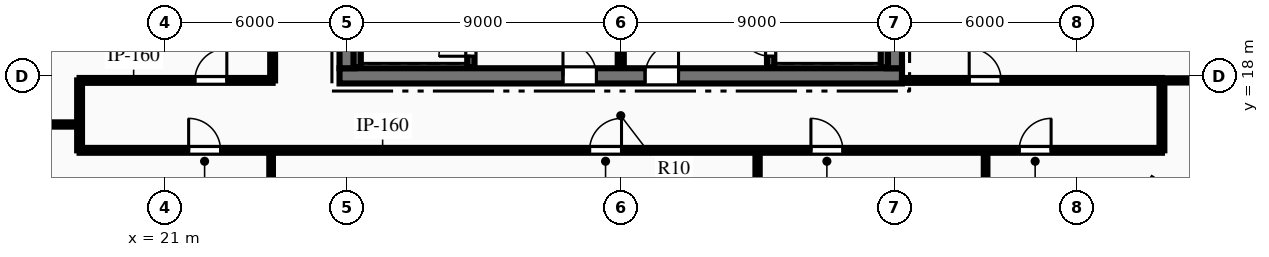
"""IFC4 building model, lengths in metres.
Left out: names, types, materials, properties, quantities, classifications, styles, units other than length and angle.
Written with IfcOpenShell. Run it as: python <this file> out.ifc"""

import sys

from ifc_helpers import new_model, si_unit, direction, frame, frame_2d, origin, place, context, subcontext, project, spatial, rectangle, extrude, element, fill, save


model = new_model("IFC4")
c1 = context("Model", 3, precision=1e-05, world=origin(), true_north=direction((0.0, 1.0)))
c2 = subcontext(c1, "Body", "Model", "MODEL_VIEW")
j1 = project(units=[si_unit("LENGTHUNIT", "METRE"), si_unit("PLANEANGLEUNIT", "RADIAN")], contexts=[c1])
p1 = place(None, origin())
s1 = spatial("IfcSite", under=j1, at=p1, CompositionType="ELEMENT")
p2 = place(p1, origin())
s2 = spatial("IfcBuilding", under=s1, at=p2, CompositionType="ELEMENT")
p3 = place(p2, frame((0.0, 0.0, 228.45)))
s3 = spatial("IfcBuildingStorey", under=s2, at=p3, CompositionType="ELEMENT", Elevation=228.45)
p4 = place(p3, frame((26.75, 18.0, 0.0), z_axis=(0.0, 0.0, 1.0), x_axis=(1.0, 0.0, 0.0)))
e1 = element("IfcWall", 1, at=p4, inside=s3, PredefinedType="SHEAR", context=c2, shape_type="SweptSolid", body=[
    extrude(rectangle(XDim=18.5, YDim=0.5, at=frame_2d((9.25, 0.0))), origin(), (0.0, 0.0, 1.0), 3.75),
])
p5 = place(p4, frame((7.35, 0.0, 0.0)))
e2 = element("IfcOpeningElement", 2, at=p5, cuts=e1, PredefinedType="OPENING", context=c2, shape_type="SweptSolid", body=[
    extrude(rectangle(XDim=1.1, YDim=2.15, at=frame_2d((0.55, 1.075))), frame((0.0, 0.26, 0.0), z_axis=(0.0, -1.0, 0.0), x_axis=(1.0, 0.0, 0.0)), (0.0, 0.0, 1.0), 0.52),
])
p6 = place(p4, frame((10.05, 0.0, 0.0)))
e3 = element("IfcOpeningElement", 3, at=p6, cuts=e1, PredefinedType="OPENING", context=c2, shape_type="SweptSolid", body=[
    extrude(rectangle(XDim=1.1, YDim=2.15, at=frame_2d((0.55, 1.075))), frame((0.0, 0.26, 0.0), z_axis=(0.0, -1.0, 0.0), x_axis=(1.0, 0.0, 0.0)), (0.0, 0.0, 1.0), 0.52),
])
p7 = place(p3, frame((27.0, 18.25, 0.0), z_axis=(0.0, 0.0, 1.0), x_axis=(0.0, 1.0, 0.0)))
e4 = element("IfcWall", 4, at=p7, inside=s3, PredefinedType="SHEAR", context=c2, shape_type="SweptSolid", body=[
    extrude(rectangle(XDim=15.5, YDim=0.5, at=frame_2d((7.75, 0.0))), origin(), (0.0, 0.0, 1.0), 3.75),
])
p8 = place(p7, frame((9.99, 0.0, 0.0)))
e5 = element("IfcOpeningElement", 5, at=p8, cuts=e4, PredefinedType="OPENING", context=c2, shape_type="SweptSolid", body=[
    extrude(rectangle(XDim=1.4, YDim=2.2, at=frame_2d((0.7, 1.1))), frame((0.0, 0.26, 0.0), z_axis=(0.0, -1.0, 0.0), x_axis=(1.0, 0.0, 0.0)), (0.0, 0.0, 1.0), 0.52),
])
p9 = place(p3, frame((45.0, 18.25, 0.0), z_axis=(0.0, 0.0, 1.0), x_axis=(0.0, 1.0, 0.0)))
e6 = element("IfcWall", 6, at=p9, inside=s3, PredefinedType="SHEAR", context=c2, shape_type="SweptSolid", body=[
    extrude(rectangle(XDim=15.5, YDim=0.5, at=frame_2d((7.75, 0.0))), origin(), (0.0, 0.0, 1.0), 3.75),
])
p10 = place(p9, frame((9.99, 0.0, 0.0)))
e7 = element("IfcOpeningElement", 7, at=p10, cuts=e6, PredefinedType="OPENING", context=c2, shape_type="SweptSolid", body=[
    extrude(rectangle(XDim=1.4, YDim=2.2, at=frame_2d((0.7, 1.1))), frame((0.0, 0.26, 0.0), z_axis=(0.0, -1.0, 0.0), x_axis=(1.0, 0.0, 0.0)), (0.0, 0.0, 1.0), 0.52),
])
p11 = place(p3, frame((31.07, 18.28, 0.0), z_axis=(0.0, 0.0, 1.0), x_axis=(0.0, 1.0, 0.0)))
e8 = element("IfcWall", 8, at=p11, inside=s3, PredefinedType="SHEAR", context=c2, shape_type="SweptSolid", body=[
    extrude(rectangle(XDim=8.26, YDim=0.24, at=frame_2d((4.13, 0.0))), origin(), (0.0, 0.0, 1.0), 3.75),
])
p12 = place(p11, frame((0.365, 0.0, 0.0)))
e9 = element("IfcOpeningElement", 9, at=p12, cuts=e8, PredefinedType="OPENING", context=c2, shape_type="SweptSolid", body=[
    extrude(rectangle(XDim=1.05, YDim=2.15, at=frame_2d((0.525, 1.075))), frame((0.0, 0.13, 0.0), z_axis=(0.0, -1.0, 0.0), x_axis=(1.0, 0.0, 0.0)), (0.0, 0.0, 1.0), 0.26),
])
p13 = place(p3, frame((27.33, 18.28, 0.0), z_axis=(0.0, 0.0, 1.0), x_axis=(0.0, 1.0, 0.0)))
e10 = element("IfcWall", 10, at=p13, inside=s3, PredefinedType="SHEAR", context=c2, shape_type="SweptSolid", body=[
    extrude(rectangle(XDim=8.26, YDim=0.24, at=frame_2d((4.13, 0.0))), origin(), (0.0, 0.0, 1.0), 3.75),
])
p14 = place(p3, frame((40.93, 18.28, 0.0), z_axis=(0.0, 0.0, 1.0), x_axis=(0.0, 1.0, 0.0)))
e11 = element("IfcWall", 11, at=p14, inside=s3, PredefinedType="SHEAR", context=c2, shape_type="SweptSolid", body=[
    extrude(rectangle(XDim=8.26, YDim=0.24, at=frame_2d((4.13, 0.0))), origin(), (0.0, 0.0, 1.0), 3.75),
])
p15 = place(p14, frame((0.365, 0.0, 0.0)))
e12 = element("IfcOpeningElement", 12, at=p15, cuts=e11, PredefinedType="OPENING", context=c2, shape_type="SweptSolid", body=[
    extrude(rectangle(XDim=1.05, YDim=2.15, at=frame_2d((0.525, 1.075))), frame((0.0, 0.13, 0.0), z_axis=(0.0, -1.0, 0.0), x_axis=(1.0, 0.0, 0.0)), (0.0, 0.0, 1.0), 0.26),
])
p16 = place(p3, frame((44.67, 18.28, 0.0), z_axis=(0.0, 0.0, 1.0), x_axis=(0.0, 1.0, 0.0)))
e13 = element("IfcWall", 13, at=p16, inside=s3, PredefinedType="SHEAR", context=c2, shape_type="SweptSolid", body=[
    extrude(rectangle(XDim=8.26, YDim=0.24, at=frame_2d((4.13, 0.0))), origin(), (0.0, 0.0, 1.0), 3.75),
])
p17 = place(p3, frame((36.0, 18.28, 0.0), z_axis=(0.0, 0.0, 1.0), x_axis=(0.0, 1.0, 0.0)))
e14 = element("IfcWall", 14, at=p17, inside=s3, PredefinedType="PARTITIONING", context=c2, shape_type="SweptSolid", body=[
    extrude(rectangle(XDim=3.77, YDim=0.2, at=frame_2d((1.885, 0.0))), origin(), (0.0, 0.0, 1.0), 3.47),
])
p18 = place(p3, frame((18.2, 15.55, 0.0), z_axis=(0.0, 0.0, 1.0), x_axis=(1.0, 0.0, 0.0)))
e15 = element("IfcWall", 15, at=p18, inside=s3, PredefinedType="PARTITIONING", context=c2, shape_type="SweptSolid", body=[
    extrude(rectangle(XDim=35.6, YDim=0.16, at=frame_2d((17.8, 0.0))), origin(), (0.0, 0.0, 1.0), 3.008),
])
p19 = place(p18, frame((3.587, 0.0, 0.0)))
e16 = element("IfcOpeningElement", 16, at=p19, cuts=e15, PredefinedType="OPENING", context=c2, shape_type="SweptSolid", body=[
    extrude(rectangle(XDim=1.05, YDim=2.15, at=frame_2d((0.525, 1.075))), frame((0.0, 0.09, 0.0), z_axis=(0.0, -1.0, 0.0), x_axis=(1.0, 0.0, 0.0)), (0.0, 0.0, 1.0), 0.18),
])
p20 = place(p18, frame((16.775, 0.0, 0.0)))
e17 = element("IfcOpeningElement", 17, at=p20, cuts=e15, PredefinedType="OPENING", context=c2, shape_type="SweptSolid", body=[
    extrude(rectangle(XDim=1.05, YDim=2.15, at=frame_2d((0.525, 1.075))), frame((0.0, 0.09, 0.0), z_axis=(0.0, -1.0, 0.0), x_axis=(1.0, 0.0, 0.0)), (0.0, 0.0, 1.0), 0.18),
])
p21 = place(p18, frame((24.055, 0.0, 0.0)))
e18 = element("IfcOpeningElement", 18, at=p21, cuts=e15, PredefinedType="OPENING", context=c2, shape_type="SweptSolid", body=[
    extrude(rectangle(XDim=1.05, YDim=2.15, at=frame_2d((0.525, 1.075))), frame((0.0, 0.09, 0.0), z_axis=(0.0, -1.0, 0.0), x_axis=(1.0, 0.0, 0.0)), (0.0, 0.0, 1.0), 0.18),
])
p22 = place(p18, frame((30.905, 0.0, 0.0)))
e19 = element("IfcOpeningElement", 19, at=p22, cuts=e15, PredefinedType="OPENING", context=c2, shape_type="SweptSolid", body=[
    extrude(rectangle(XDim=1.05, YDim=2.15, at=frame_2d((0.525, 1.075))), frame((0.0, 0.09, 0.0), z_axis=(0.0, -1.0, 0.0), x_axis=(1.0, 0.0, 0.0)), (0.0, 0.0, 1.0), 0.18),
])
p23 = place(p3, frame((18.2, 17.85, 0.0), z_axis=(0.0, 0.0, 1.0), x_axis=(1.0, 0.0, 0.0)))
e20 = element("IfcWall", 20, at=p23, inside=s3, PredefinedType="PARTITIONING", context=c2, shape_type="SweptSolid", body=[
    extrude(rectangle(XDim=6.35, YDim=0.16, at=frame_2d((3.175, 0.0))), origin(), (0.0, 0.0, 1.0), 3.47),
])
p24 = place(p23, frame((3.793, 0.0, 0.0)))
e21 = element("IfcOpeningElement", 21, at=p24, cuts=e20, PredefinedType="OPENING", context=c2, shape_type="SweptSolid", body=[
    extrude(rectangle(XDim=1.05, YDim=2.15, at=frame_2d((0.525, 1.075))), frame((0.0, 0.09, 0.0), z_axis=(0.0, -1.0, 0.0), x_axis=(1.0, 0.0, 0.0)), (0.0, 0.0, 1.0), 0.18),
])
p25 = place(p3, frame((45.25, 17.85, 0.0), z_axis=(0.0, 0.0, 1.0), x_axis=(1.0, 0.0, 0.0)))
e22 = element("IfcWall", 22, at=p25, inside=s3, PredefinedType="PARTITIONING", context=c2, shape_type="SweptSolid", body=[
    extrude(rectangle(XDim=8.55, YDim=0.16, at=frame_2d((4.275, 0.0))), origin(), (0.0, 0.0, 1.0), 3.47),
])
p26 = place(p25, frame((2.211, 0.0, 0.0)))
e23 = element("IfcOpeningElement", 23, at=p26, cuts=e22, PredefinedType="OPENING", context=c2, shape_type="SweptSolid", body=[
    extrude(rectangle(XDim=1.05, YDim=2.15, at=frame_2d((0.525, 1.075))), frame((0.0, 0.09, 0.0), z_axis=(0.0, -1.0, 0.0), x_axis=(1.0, 0.0, 0.0)), (0.0, 0.0, 1.0), 0.18),
])
p27 = place(p3, frame((24.55, 17.85, 0.0), z_axis=(0.0, 0.0, 1.0), x_axis=(0.0, 1.0, 0.0)))
e24 = element("IfcWall", 24, at=p27, inside=s3, PredefinedType="PARTITIONING", context=c2, shape_type="SweptSolid", body=[
    extrude(rectangle(XDim=16.3, YDim=0.16, at=frame_2d((8.15, 0.0))), origin(), (0.0, 0.0, 1.0), 3.47),
])
p28 = place(p27, frame((5.425, 0.0, 0.0)))
e25 = element("IfcOpeningElement", 25, at=p28, cuts=e24, PredefinedType="OPENING", context=c2, shape_type="SweptSolid", body=[
    extrude(rectangle(XDim=1.05, YDim=2.15, at=frame_2d((0.525, 1.075))), frame((0.0, 0.09, 0.0), z_axis=(0.0, -1.0, 0.0), x_axis=(1.0, 0.0, 0.0)), (0.0, 0.0, 1.0), 0.18),
])
p29 = place(p27, frame((11.367, 0.0, 0.0)))
e26 = element("IfcOpeningElement", 26, at=p29, cuts=e24, PredefinedType="OPENING", context=c2, shape_type="SweptSolid", body=[
    extrude(rectangle(XDim=1.05, YDim=2.15, at=frame_2d((0.525, 1.075))), frame((0.0, 0.09, 0.0), z_axis=(0.0, -1.0, 0.0), x_axis=(1.0, 0.0, 0.0)), (0.0, 0.0, 1.0), 0.18),
])
for number, where, z_axis, x_axis in (
    (27, (18.2, 15.55, 0.0), (0.0, 0.0, 1.0), (0.0, 1.0, 0.0)),
    (28, (53.8, 15.55, 0.0), (0.0, 0.0, 1.0), (0.0, 1.0, 0.0)),
):
    element("IfcWall", number, at=place(p3, frame(where, z_axis=z_axis, x_axis=x_axis)), inside=s3, PredefinedType="PARTITIONING", context=c2, shape_type="SweptSolid", body=[
        extrude(rectangle(XDim=2.3, YDim=0.16, at=frame_2d((1.15, 0.0))), origin(), (0.0, 0.0, 1.0), 3.47),
    ])
p30 = place(p3, frame((9.112, 16.4, 0.0), z_axis=(0.0, 0.0, 1.0), x_axis=(1.0, 0.0, 0.0)))
e29 = element("IfcWall", 29, at=p30, inside=s3, PredefinedType="PARTITIONING", context=c2, shape_type="SweptSolid", body=[
    extrude(rectangle(XDim=9.088, YDim=0.14, at=frame_2d((4.544, 0.0))), origin(), (0.0, 0.0, 1.0), 3.47),
])
p31 = place(p3, frame((53.8, 17.85, 0.0), z_axis=(0.0, 0.0, 1.0), x_axis=(1.0, 0.0, 0.0)))
e30 = element("IfcWall", 30, at=p31, inside=s3, PredefinedType="PARTITIONING", context=c2, shape_type="SweptSolid", body=[
    extrude(rectangle(XDim=4.398, YDim=0.14, at=frame_2d((2.199, 0.0))), origin(), (0.0, 0.0, 1.0), 3.47),
])
p32 = place(p3, frame((24.5, 5.028, 0.0), z_axis=(0.0, 0.0, 1.0), x_axis=(0.0, 1.0, 0.0)))
e31 = element("IfcWall", 31, at=p32, inside=s3, PredefinedType="PARTITIONING", context=c2, shape_type="SweptSolid", body=[
    extrude(rectangle(XDim=10.522, YDim=0.12, at=frame_2d((5.261, 0.0))), origin(), (0.0, 0.0, 1.0), 2.849),
])
p33 = place(p3, frame((40.5, -4.284, 0.0), z_axis=(0.0, 0.0, 1.0), x_axis=(0.0, 1.0, 0.0)))
e32 = element("IfcWall", 32, at=p33, inside=s3, PredefinedType="PARTITIONING", context=c2, shape_type="SweptSolid", body=[
    extrude(rectangle(XDim=19.834, YDim=0.14, at=frame_2d((9.917, 0.0))), origin(), (0.0, 0.0, 1.0), 2.849),
])
p34 = place(p3, frame((48.0, 0.327, 0.0), z_axis=(0.0, 0.0, 1.0), x_axis=(0.0, 1.0, 0.0)))
e33 = element("IfcWall", 33, at=p34, inside=s3, PredefinedType="PARTITIONING", context=c2, shape_type="SweptSolid", body=[
    extrude(rectangle(XDim=15.223, YDim=0.12, at=frame_2d((7.611, 0.0))), origin(), (0.0, 0.0, 1.0), 3.47),
])
p35 = place(p12, origin())
e34 = element("IfcDoor", 34, at=p35, inside=s3, OperationType="SINGLE_SWING_LEFT", PredefinedType="DOOR", context=c2, shape_type="SweptSolid", body=[
    extrude(rectangle(XDim=1.05, YDim=2.15, at=frame_2d((0.525, 1.075))), frame((0.0, 0.025, 0.0), z_axis=(0.0, -1.0, 0.0), x_axis=(1.0, 0.0, 0.0)), (0.0, 0.0, 1.0), 0.05),
])
fill(e9, e34)
p36 = place(p15, origin())
e35 = element("IfcDoor", 35, at=p36, inside=s3, OperationType="SINGLE_SWING_RIGHT", PredefinedType="DOOR", context=c2, shape_type="SweptSolid", body=[
    extrude(rectangle(XDim=1.05, YDim=2.15, at=frame_2d((0.525, 1.075))), frame((0.0, 0.025, 0.0), z_axis=(0.0, -1.0, 0.0), x_axis=(1.0, 0.0, 0.0)), (0.0, 0.0, 1.0), 0.05),
])
fill(e12, e35)
p37 = place(p5, origin())
e36 = element("IfcDoor", 36, at=p37, inside=s3, OperationType="SINGLE_SWING_LEFT", PredefinedType="DOOR", context=c2, shape_type="SweptSolid", body=[
    extrude(rectangle(XDim=1.1, YDim=2.15, at=frame_2d((0.55, 1.075))), frame((0.0, 0.025, 0.0), z_axis=(0.0, -1.0, 0.0), x_axis=(1.0, 0.0, 0.0)), (0.0, 0.0, 1.0), 0.05),
])
fill(e2, e36)
p38 = place(p6, origin())
e37 = element("IfcDoor", 37, at=p38, inside=s3, OperationType="SINGLE_SWING_RIGHT", PredefinedType="DOOR", context=c2, shape_type="SweptSolid", body=[
    extrude(rectangle(XDim=1.1, YDim=2.15, at=frame_2d((0.55, 1.075))), frame((0.0, 0.025, 0.0), z_axis=(0.0, -1.0, 0.0), x_axis=(1.0, 0.0, 0.0)), (0.0, 0.0, 1.0), 0.05),
])
fill(e3, e37)
p39 = place(p19, origin())
e38 = element("IfcDoor", 38, at=p39, inside=s3, OperationType="SINGLE_SWING_LEFT", PredefinedType="DOOR", context=c2, shape_type="SweptSolid", body=[
    extrude(rectangle(XDim=1.05, YDim=2.15, at=frame_2d((0.525, 1.075))), frame((0.0, 0.025, 0.0), z_axis=(0.0, -1.0, 0.0), x_axis=(1.0, 0.0, 0.0)), (0.0, 0.0, 1.0), 0.05),
])
fill(e16, e38)
p40 = place(p20, origin())
e39 = element("IfcDoor", 39, at=p40, inside=s3, OperationType="SINGLE_SWING_RIGHT", PredefinedType="DOOR", context=c2, shape_type="SweptSolid", body=[
    extrude(rectangle(XDim=1.05, YDim=2.15, at=frame_2d((0.525, 1.075))), frame((0.0, 0.025, 0.0), z_axis=(0.0, -1.0, 0.0), x_axis=(1.0, 0.0, 0.0)), (0.0, 0.0, 1.0), 0.05),
])
fill(e17, e39)
p41 = place(p21, origin())
e40 = element("IfcDoor", 40, at=p41, inside=s3, OperationType="SINGLE_SWING_LEFT", PredefinedType="DOOR", context=c2, shape_type="SweptSolid", body=[
    extrude(rectangle(XDim=1.05, YDim=2.15, at=frame_2d((0.525, 1.075))), frame((0.0, 0.025, 0.0), z_axis=(0.0, -1.0, 0.0), x_axis=(1.0, 0.0, 0.0)), (0.0, 0.0, 1.0), 0.05),
])
fill(e18, e40)
p42 = place(p22, origin())
e41 = element("IfcDoor", 41, at=p42, inside=s3, OperationType="SINGLE_SWING_RIGHT", PredefinedType="DOOR", context=c2, shape_type="SweptSolid", body=[
    extrude(rectangle(XDim=1.05, YDim=2.15, at=frame_2d((0.525, 1.075))), frame((0.0, 0.025, 0.0), z_axis=(0.0, -1.0, 0.0), x_axis=(1.0, 0.0, 0.0)), (0.0, 0.0, 1.0), 0.05),
])
fill(e19, e41)
p43 = place(p24, origin())
e42 = element("IfcDoor", 42, at=p43, inside=s3, OperationType="SINGLE_SWING_RIGHT", PredefinedType="DOOR", context=c2, shape_type="SweptSolid", body=[
    extrude(rectangle(XDim=1.05, YDim=2.15, at=frame_2d((0.525, 1.075))), frame((0.0, 0.025, 0.0), z_axis=(0.0, -1.0, 0.0), x_axis=(1.0, 0.0, 0.0)), (0.0, 0.0, 1.0), 0.05),
])
fill(e21, e42)
p44 = place(p26, origin())
e43 = element("IfcDoor", 43, at=p44, inside=s3, OperationType="SINGLE_SWING_LEFT", PredefinedType="DOOR", context=c2, shape_type="SweptSolid", body=[
    extrude(rectangle(XDim=1.05, YDim=2.15, at=frame_2d((0.525, 1.075))), frame((0.0, 0.025, 0.0), z_axis=(0.0, -1.0, 0.0), x_axis=(1.0, 0.0, 0.0)), (0.0, 0.0, 1.0), 0.05),
])
fill(e23, e43)
save(model, sys.argv[1])
